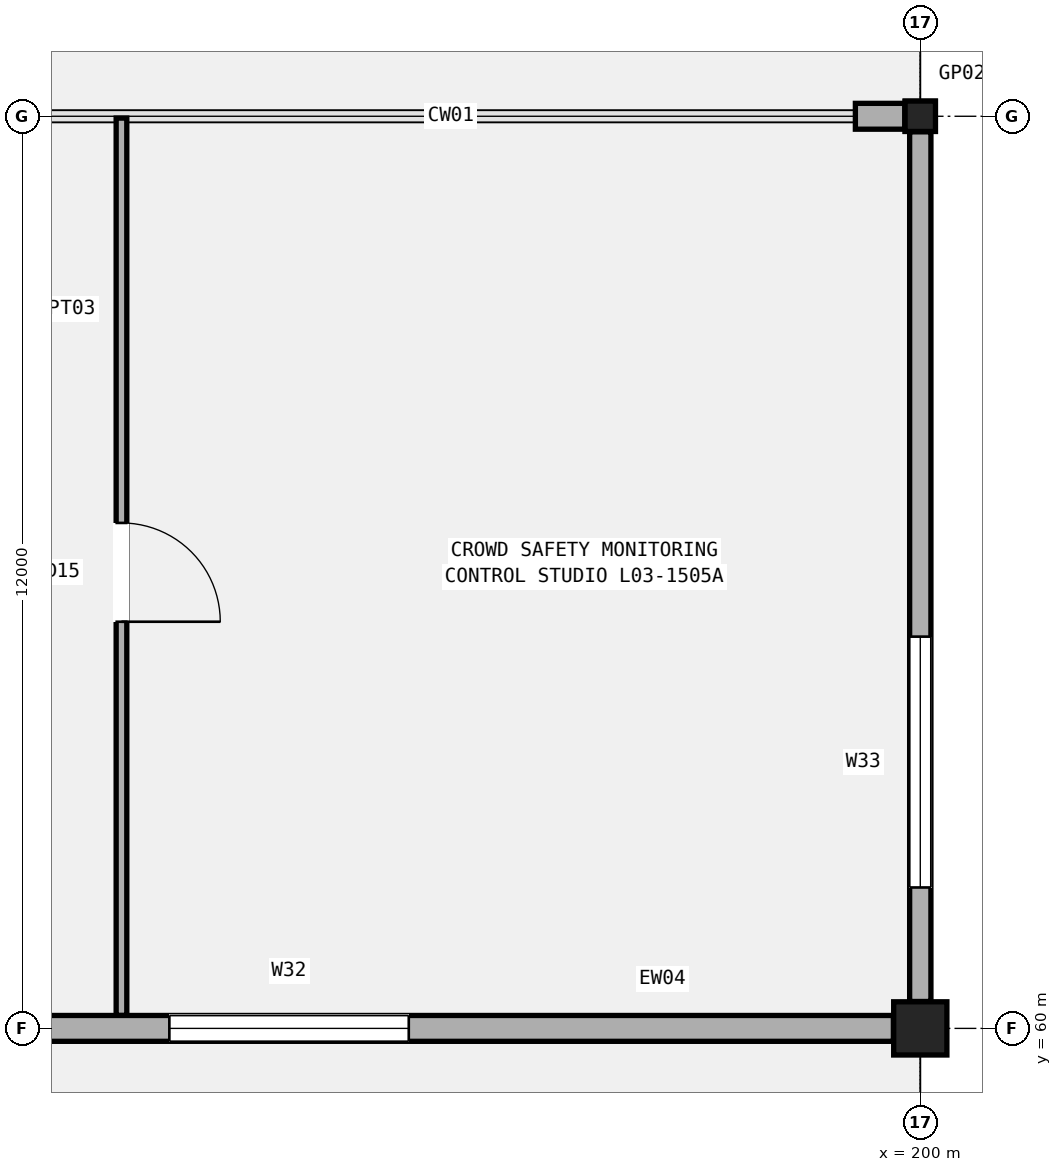
"""IFC4 building model, lengths in metres.
Left out: names, types, materials, properties, quantities, classifications, styles, units other than length and angle.
Written with IfcOpenShell. Run it as: python <this file> out.ifc"""

import sys

from ifc_helpers import new_model, si_unit, direction, frame, frame_2d, origin, origin_2d, place, context, subcontext, project, spatial, rectangle, hollow_rectangle, extrude, element, fill, save


model = new_model("IFC4")
c1 = context("Model", 3, precision=1e-05, world=origin(), true_north=direction((0.0, 1.0)))
c2 = subcontext(c1, "Body", "Model", "MODEL_VIEW")
j1 = project(units=[si_unit("LENGTHUNIT", "METRE"), si_unit("PLANEANGLEUNIT", "RADIAN")], contexts=[c1])
p1 = place(None, origin())
s1 = spatial("IfcSite", under=j1, at=p1, CompositionType="ELEMENT")
p2 = place(p1, origin())
s2 = spatial("IfcBuilding", under=s1, at=p2, CompositionType="ELEMENT")
p3 = place(p2, frame((0.0, 0.0, 15.3)))
s3 = spatial("IfcBuildingStorey", under=s2, at=p3, CompositionType="ELEMENT", Elevation=15.3)
p4 = place(p3, frame((200.0, 60.0, 0.0), z_axis=(0.0, 0.0, 1.0), x_axis=(1.0, 0.0, 0.0)))
e1 = element("IfcColumn", 1, at=p4, inside=s3, PredefinedType="COLUMN", context=c2, shape_type="SweptSolid", body=[
    extrude(rectangle(XDim=0.7, YDim=0.7, at=origin_2d()), origin(), (0.0, 0.0, 1.0), 5.1),
])
p5 = place(p3, frame((200.0, 72.0, 0.0), z_axis=(0.0, 0.0, 1.0), x_axis=(1.0, 0.0, 0.0)))
e2 = element("IfcColumn", 2, at=p5, inside=s3, PredefinedType="COLUMN", context=c2, shape_type="SweptSolid", body=[
    extrude(hollow_rectangle(XDim=0.4, YDim=0.4, WallThickness=0.016, InnerFilletRadius=0.016, OuterFilletRadius=0.032, at=origin_2d()), origin(), (0.0, 0.0, 1.0), 5.1),
])
p6 = place(p3, frame((187.904, 60.0, 0.0), z_axis=(0.0, 0.0, 1.0), x_axis=(1.0, 0.0, 0.0)))
e3 = element("IfcWall", 3, at=p6, inside=s3, PredefinedType="SOLIDWALL", context=c2, shape_type="SweptSolid", body=[
    extrude(rectangle(XDim=11.742, YDim=0.34, at=frame_2d((5.871, 0.0))), origin(), (0.0, 0.0, 1.0), 4.172),
])
p7 = place(p6, frame((2.216, 0.0, 0.95)))
e4 = element("IfcOpeningElement", 4, at=p7, cuts=e3, PredefinedType="OPENING", context=c2, shape_type="SweptSolid", body=[
    extrude(rectangle(XDim=3.15, YDim=1.9, at=frame_2d((1.575, 0.95))), frame((0.0, 0.18, 0.0), z_axis=(0.0, -1.0, 0.0), x_axis=(1.0, 0.0, 0.0)), (0.0, 0.0, 1.0), 0.36),
])
p8 = place(p3, frame((199.146, 72.0, 0.0), z_axis=(0.0, 0.0, 1.0), x_axis=(1.0, 0.0, 0.0)))
e5 = element("IfcWall", 5, at=p8, inside=s3, PredefinedType="SOLIDWALL", context=c2, shape_type="SweptSolid", body=[
    extrude(rectangle(XDim=0.65, YDim=0.34, at=frame_2d((0.325, 0.0))), origin(), (0.0, 0.0, 1.0), 4.06),
])
p9 = place(p3, frame((200.0, 60.354, 0.0), z_axis=(0.0, 0.0, 1.0), x_axis=(0.0, 1.0, 0.0)))
e6 = element("IfcWall", 6, at=p9, inside=s3, PredefinedType="SOLIDWALL", context=c2, shape_type="SweptSolid", body=[
    extrude(rectangle(XDim=11.442, YDim=0.28, at=frame_2d((5.721, 0.0))), origin(), (0.0, 0.0, 1.0), 4.06),
])
p10 = place(p9, frame((1.5, 0.0, 0.95)))
e7 = element("IfcOpeningElement", 7, at=p10, cuts=e6, PredefinedType="OPENING", context=c2, shape_type="SweptSolid", body=[
    extrude(rectangle(XDim=3.3, YDim=1.8, at=frame_2d((1.65, 0.9))), frame((0.0, 0.15, 0.0), z_axis=(0.0, -1.0, 0.0), x_axis=(1.0, 0.0, 0.0)), (0.0, 0.0, 1.0), 0.3),
])
p11 = place(p3, frame((189.49, 60.172, 0.0), z_axis=(0.0, 0.0, 1.0), x_axis=(0.0, 1.0, 0.0)))
e8 = element("IfcWall", 8, at=p11, inside=s3, PredefinedType="PARTITIONING", context=c2, shape_type="SweptSolid", body=[
    extrude(rectangle(XDim=11.804, YDim=0.14, at=frame_2d((5.902, 0.0))), origin(), (0.0, 0.0, 1.0), 4.22),
])
p12 = place(p11, frame((6.478, 0.0, 0.0), z_axis=(0.0, 0.0, 1.0), x_axis=(-1.0, 0.0, 0.0)))
e9 = element("IfcOpeningElement", 9, at=p12, cuts=e8, PredefinedType="OPENING", context=c2, shape_type="SweptSolid", body=[
    extrude(rectangle(XDim=1.3, YDim=2.24, at=frame_2d((0.65, 1.12))), frame((0.0, 0.08, 0.0), z_axis=(0.0, -1.0, 0.0), x_axis=(1.0, 0.0, 0.0)), (0.0, 0.0, 1.0), 0.16),
])
p13 = place(p7, origin())
e10 = element("IfcWindow", 10, at=p13, inside=s3, PartitioningType="SINGLE_PANEL", PredefinedType="WINDOW", context=c2, shape_type="SweptSolid", body=[
    extrude(rectangle(XDim=3.15, YDim=1.9, at=frame_2d((1.575, 0.95))), frame((0.0, 0.03, 0.0), z_axis=(0.0, -1.0, 0.0), x_axis=(1.0, 0.0, 0.0)), (0.0, 0.0, 1.0), 0.06),
])
fill(e4, e10)
p14 = place(p10, origin())
e11 = element("IfcWindow", 11, at=p14, inside=s3, PartitioningType="SINGLE_PANEL", PredefinedType="WINDOW", context=c2, shape_type="SweptSolid", body=[
    extrude(rectangle(XDim=3.3, YDim=1.8, at=frame_2d((1.65, 0.9))), frame((0.0, 0.03, 0.0), z_axis=(0.0, -1.0, 0.0), x_axis=(1.0, 0.0, 0.0)), (0.0, 0.0, 1.0), 0.06),
])
fill(e7, e11)
p15 = place(p12, origin())
e12 = element("IfcDoor", 12, at=p15, inside=s3, OperationType="SINGLE_SWING_RIGHT", PredefinedType="DOOR", context=c2, shape_type="SweptSolid", body=[
    extrude(rectangle(XDim=1.3, YDim=2.24, at=frame_2d((0.65, 1.12))), frame((0.0, 0.025, 0.0), z_axis=(0.0, -1.0, 0.0), x_axis=(1.0, 0.0, 0.0)), (0.0, 0.0, 1.0), 0.05),
])
fill(e9, e12)
save(model, sys.argv[1])
